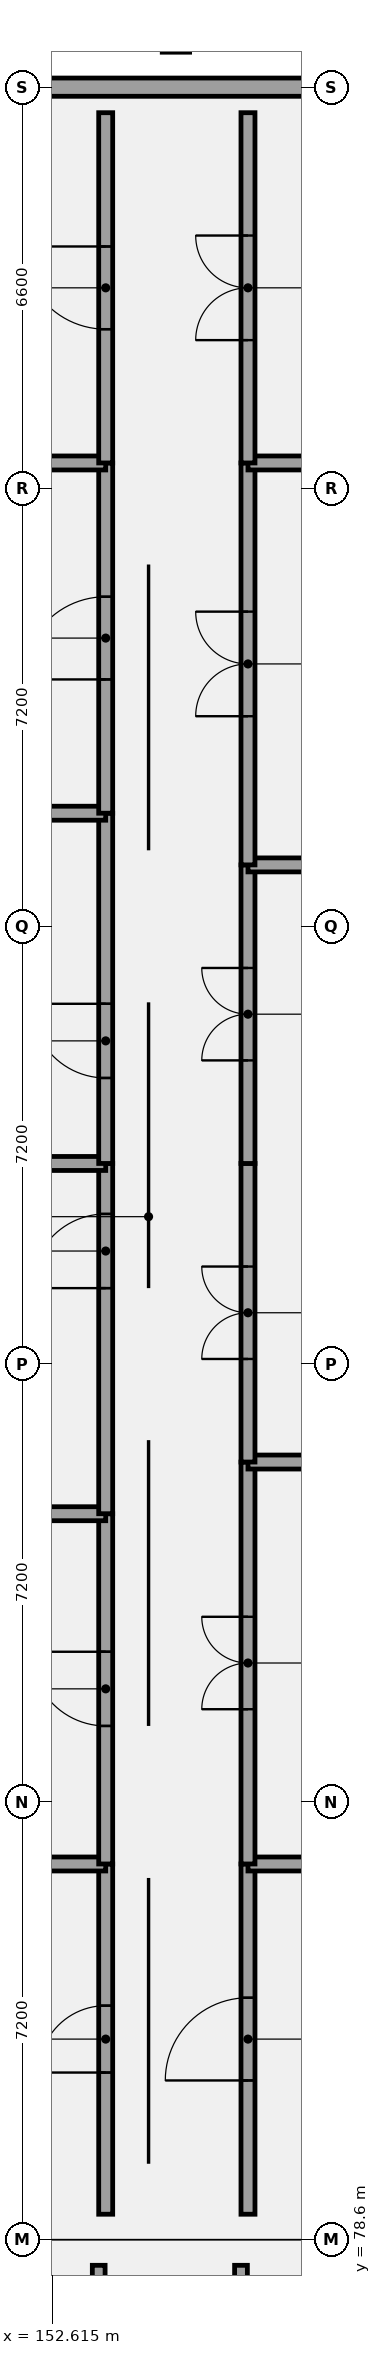
"""IFC4 building model, lengths in metres.
Left out: names, types, materials, properties, quantities, classifications, styles, units other than length and angle.
Written with IfcOpenShell. Run it as: python <this file> out.ifc"""

import sys

from ifc_helpers import new_model, si_unit, direction, frame, frame_2d, origin, origin_2d, place, context, subcontext, project, spatial, rectangle, extrude, element, fill, save


model = new_model("IFC4")
c1 = context("Model", 3, precision=1e-05, world=origin(), true_north=direction((0.0, 1.0)))
c2 = subcontext(c1, "Body", "Model", "MODEL_VIEW")
j1 = project(units=[si_unit("LENGTHUNIT", "METRE"), si_unit("PLANEANGLEUNIT", "RADIAN")], contexts=[c1])
p1 = place(None, origin())
s1 = spatial("IfcSite", under=j1, at=p1, CompositionType="ELEMENT")
p2 = place(p1, origin())
s2 = spatial("IfcBuilding", under=s1, at=p2, CompositionType="ELEMENT")
p3 = place(p2, frame((0.0, 0.0, 9.6)))
s3 = spatial("IfcBuildingStorey", under=s2, at=p3, CompositionType="ELEMENT", Elevation=9.6)
p4 = place(p3, frame((154.65, 114.95, 0.0), z_axis=(0.0, 0.0, 1.0), x_axis=(1.0, 0.0, 0.0)))
e1 = element("IfcColumn", 1, at=p4, inside=s3, PredefinedType="PILASTER", context=c2, shape_type="SweptSolid", body=[
    extrude(rectangle(XDim=0.45, YDim=0.75, at=origin_2d()), origin(), (0.0, 0.0, 1.0), 4.2),
])
p5 = place(p3, frame((166.35, 114.0, 0.0), z_axis=(0.0, 0.0, 1.0), x_axis=(-1.0, 0.0, 0.0)))
e2 = element("IfcWall", 2, at=p5, inside=s3, PredefinedType="SOLIDWALL", context=c2, shape_type="SweptSolid", body=[
    extrude(rectangle(XDim=21.9, YDim=0.3, at=frame_2d((10.95, 0.0))), origin(), (0.0, 0.0, 1.0), 3.19),
])
p6 = place(p5, frame((17.5, 0.0, 0.95)))
e3 = element("IfcOpeningElement", 3, at=p6, cuts=e2, PredefinedType="OPENING", context=c2, shape_type="SweptSolid", body=[
    extrude(rectangle(XDim=1.3, YDim=1.65, at=frame_2d((0.65, 0.825))), frame((0.0, 0.16, 0.0), z_axis=(0.0, -1.0, 0.0), x_axis=(1.0, 0.0, 0.0)), (0.0, 0.0, 1.0), 0.32),
])
p7 = place(p3, frame((153.495, 79.02, 0.0), z_axis=(0.0, 0.0, 1.0), x_axis=(0.0, 1.0, 0.0)))
e4 = element("IfcWall", 4, at=p7, inside=s3, PredefinedType="PARTITIONING", context=c2, shape_type="SweptSolid", body=[
    extrude(rectangle(XDim=5.76, YDim=0.23, at=frame_2d((2.88, 0.0))), origin(), (0.0, 0.0, 1.0), 3.94),
])
p8 = place(p7, frame((2.33, 0.0, 0.0)))
e5 = element("IfcOpeningElement", 5, at=p8, cuts=e4, PredefinedType="OPENING", context=c2, shape_type="SweptSolid", body=[
    extrude(rectangle(XDim=1.1, YDim=2.35, at=frame_2d((0.55, 1.175))), frame((0.0, 0.125, 0.0), z_axis=(0.0, -1.0, 0.0), x_axis=(1.0, 0.0, 0.0)), (0.0, 0.0, 1.0), 0.25),
])
p9 = place(p3, frame((145.25, 84.78, 0.0), z_axis=(0.0, 0.0, 1.0), x_axis=(1.0, 0.0, 0.0)))
e6 = element("IfcWall", 6, at=p9, inside=s3, PredefinedType="PARTITIONING", context=c2, shape_type="SweptSolid", body=[
    extrude(rectangle(XDim=8.245, YDim=0.23, at=frame_2d((4.123, 0.0))), origin(), (0.0, 0.0, 1.0), 3.94),
])
p10 = place(p3, frame((153.495, 84.78, 0.0), z_axis=(0.0, 0.0, 1.0), x_axis=(0.0, 1.0, 0.0)))
e7 = element("IfcWall", 7, at=p10, inside=s3, PredefinedType="PARTITIONING", context=c2, shape_type="SweptSolid", body=[
    extrude(rectangle(XDim=5.76, YDim=0.23, at=frame_2d((2.88, 0.0))), origin(), (0.0, 0.0, 1.0), 3.94),
])
p11 = place(p10, frame((2.27, 0.0, 0.0)))
e8 = element("IfcOpeningElement", 8, at=p11, cuts=e7, PredefinedType="OPENING", context=c2, shape_type="SweptSolid", body=[
    extrude(rectangle(XDim=1.22, YDim=2.1, at=frame_2d((0.61, 1.05))), frame((0.0, 0.125, 0.0), z_axis=(0.0, -1.0, 0.0), x_axis=(1.0, 0.0, 0.0)), (0.0, 0.0, 1.0), 0.25),
])
p12 = place(p3, frame((145.25, 90.54, 0.0), z_axis=(0.0, 0.0, 1.0), x_axis=(1.0, 0.0, 0.0)))
e9 = element("IfcWall", 9, at=p12, inside=s3, PredefinedType="PARTITIONING", context=c2, shape_type="SweptSolid", body=[
    extrude(rectangle(XDim=8.245, YDim=0.23, at=frame_2d((4.123, 0.0))), origin(), (0.0, 0.0, 1.0), 3.94),
])
p13 = place(p3, frame((153.495, 90.54, 0.0), z_axis=(0.0, 0.0, 1.0), x_axis=(0.0, 1.0, 0.0)))
e10 = element("IfcWall", 10, at=p13, inside=s3, PredefinedType="PARTITIONING", context=c2, shape_type="SweptSolid", body=[
    extrude(rectangle(XDim=5.76, YDim=0.23, at=frame_2d((2.88, 0.0))), origin(), (0.0, 0.0, 1.0), 3.94),
])
p14 = place(p13, frame((3.71, 0.0, 0.0)))
e11 = element("IfcOpeningElement", 11, at=p14, cuts=e10, PredefinedType="OPENING", context=c2, shape_type="SweptSolid", body=[
    extrude(rectangle(XDim=1.22, YDim=2.22, at=frame_2d((0.61, 1.11))), frame((0.0, 0.125, 0.0), z_axis=(0.0, -1.0, 0.0), x_axis=(1.0, 0.0, 0.0)), (0.0, 0.0, 1.0), 0.25),
])
p15 = place(p3, frame((145.25, 96.3, 0.0), z_axis=(0.0, 0.0, 1.0), x_axis=(1.0, 0.0, 0.0)))
e12 = element("IfcWall", 12, at=p15, inside=s3, PredefinedType="PARTITIONING", context=c2, shape_type="SweptSolid", body=[
    extrude(rectangle(XDim=8.245, YDim=0.23, at=frame_2d((4.123, 0.0))), origin(), (0.0, 0.0, 1.0), 3.39),
])
p16 = place(p3, frame((153.495, 96.3, 0.0), z_axis=(0.0, 0.0, 1.0), x_axis=(0.0, 1.0, 0.0)))
e13 = element("IfcWall", 13, at=p16, inside=s3, PredefinedType="PARTITIONING", context=c2, shape_type="SweptSolid", body=[
    extrude(rectangle(XDim=5.76, YDim=0.23, at=frame_2d((2.88, 0.0))), origin(), (0.0, 0.0, 1.0), 3.94),
])
p17 = place(p16, frame((1.406, 0.0, 0.0)))
e14 = element("IfcOpeningElement", 14, at=p17, cuts=e13, PredefinedType="OPENING", context=c2, shape_type="SweptSolid", body=[
    extrude(rectangle(XDim=1.22, YDim=2.35, at=frame_2d((0.61, 1.175))), frame((0.0, 0.125, 0.0), z_axis=(0.0, -1.0, 0.0), x_axis=(1.0, 0.0, 0.0)), (0.0, 0.0, 1.0), 0.25),
])
p18 = place(p3, frame((145.25, 102.06, 0.0), z_axis=(0.0, 0.0, 1.0), x_axis=(1.0, 0.0, 0.0)))
e15 = element("IfcWall", 15, at=p18, inside=s3, PredefinedType="PARTITIONING", context=c2, shape_type="SweptSolid", body=[
    extrude(rectangle(XDim=8.245, YDim=0.23, at=frame_2d((4.123, 0.0))), origin(), (0.0, 0.0, 1.0), 3.39),
])
p19 = place(p3, frame((153.495, 102.06, 0.0), z_axis=(0.0, 0.0, 1.0), x_axis=(0.0, 1.0, 0.0)))
e16 = element("IfcWall", 16, at=p19, inside=s3, PredefinedType="PARTITIONING", context=c2, shape_type="SweptSolid", body=[
    extrude(rectangle(XDim=5.76, YDim=0.23, at=frame_2d((2.88, 0.0))), origin(), (0.0, 0.0, 1.0), 3.94),
])
p20 = place(p19, frame((2.2, 0.0, 0.0)))
e17 = element("IfcOpeningElement", 17, at=p20, cuts=e16, PredefinedType="OPENING", context=c2, shape_type="SweptSolid", body=[
    extrude(rectangle(XDim=1.36, YDim=2.1, at=frame_2d((0.68, 1.05))), frame((0.0, 0.125, 0.0), z_axis=(0.0, -1.0, 0.0), x_axis=(1.0, 0.0, 0.0)), (0.0, 0.0, 1.0), 0.25),
])
p21 = place(p3, frame((145.25, 107.82, 0.0), z_axis=(0.0, 0.0, 1.0), x_axis=(1.0, 0.0, 0.0)))
e18 = element("IfcWall", 18, at=p21, inside=s3, PredefinedType="PARTITIONING", context=c2, shape_type="SweptSolid", body=[
    extrude(rectangle(XDim=8.245, YDim=0.23, at=frame_2d((4.123, 0.0))), origin(), (0.0, 0.0, 1.0), 3.94),
])
p22 = place(p3, frame((153.495, 107.82, 0.0), z_axis=(0.0, 0.0, 1.0), x_axis=(0.0, 1.0, 0.0)))
e19 = element("IfcWall", 19, at=p22, inside=s3, PredefinedType="PARTITIONING", context=c2, shape_type="SweptSolid", body=[
    extrude(rectangle(XDim=5.76, YDim=0.23, at=frame_2d((2.88, 0.0))), origin(), (0.0, 0.0, 1.0), 3.94),
])
p23 = place(p22, frame((2.2, 0.0, 0.0)))
e20 = element("IfcOpeningElement", 20, at=p23, cuts=e19, PredefinedType="OPENING", context=c2, shape_type="SweptSolid", body=[
    extrude(rectangle(XDim=1.36, YDim=2.22, at=frame_2d((0.68, 1.11))), frame((0.0, 0.125, 0.0), z_axis=(0.0, -1.0, 0.0), x_axis=(1.0, 0.0, 0.0)), (0.0, 0.0, 1.0), 0.25),
])
p24 = place(p3, frame((155.835, 79.02, 0.0), z_axis=(0.0, 0.0, 1.0), x_axis=(0.0, 1.0, 0.0)))
e21 = element("IfcWall", 21, at=p24, inside=s3, PredefinedType="PARTITIONING", context=c2, shape_type="SweptSolid", body=[
    extrude(rectangle(XDim=5.76, YDim=0.23, at=frame_2d((2.88, 0.0))), origin(), (0.0, 0.0, 1.0), 3.94),
])
p25 = place(p24, frame((2.2, 0.0, 0.0)))
e22 = element("IfcOpeningElement", 22, at=p25, cuts=e21, PredefinedType="OPENING", context=c2, shape_type="SweptSolid", body=[
    extrude(rectangle(XDim=1.36, YDim=2.35, at=frame_2d((0.68, 1.175))), frame((0.0, 0.125, 0.0), z_axis=(0.0, -1.0, 0.0), x_axis=(1.0, 0.0, 0.0)), (0.0, 0.0, 1.0), 0.25),
])
p26 = place(p3, frame((155.835, 84.78, 0.0), z_axis=(0.0, 0.0, 1.0), x_axis=(1.0, 0.0, 0.0)))
e23 = element("IfcWall", 23, at=p26, inside=s3, PredefinedType="PARTITIONING", context=c2, shape_type="SweptSolid", body=[
    extrude(rectangle(XDim=10.185, YDim=0.23, at=frame_2d((5.093, 0.0))), origin(), (0.0, 0.0, 1.0), 3.94),
])
p27 = place(p3, frame((155.835, 84.78, 0.0), z_axis=(0.0, 0.0, 1.0), x_axis=(0.0, 1.0, 0.0)))
e24 = element("IfcWall", 24, at=p27, inside=s3, PredefinedType="PARTITIONING", context=c2, shape_type="SweptSolid", body=[
    extrude(rectangle(XDim=6.61, YDim=0.23, at=frame_2d((3.305, 0.0))), origin(), (0.0, 0.0, 1.0), 3.94),
])
p28 = place(p27, frame((2.545, 0.0, 0.0)))
e25 = element("IfcOpeningElement", 25, at=p28, cuts=e24, PredefinedType="OPENING", context=c2, shape_type="SweptSolid", body=[
    extrude(rectangle(XDim=1.52, YDim=2.1, at=frame_2d((0.76, 1.05))), frame((0.0, 0.125, 0.0), z_axis=(0.0, -1.0, 0.0), x_axis=(1.0, 0.0, 0.0)), (0.0, 0.0, 1.0), 0.25),
])
p29 = place(p3, frame((155.835, 91.39, 0.0), z_axis=(0.0, 0.0, 1.0), x_axis=(1.0, 0.0, 0.0)))
e26 = element("IfcWall", 26, at=p29, inside=s3, PredefinedType="PARTITIONING", context=c2, shape_type="SweptSolid", body=[
    extrude(rectangle(XDim=10.185, YDim=0.23, at=frame_2d((5.093, 0.0))), origin(), (0.0, 0.0, 1.0), 3.39),
])
p30 = place(p3, frame((155.835, 91.39, 0.0), z_axis=(0.0, 0.0, 1.0), x_axis=(0.0, 1.0, 0.0)))
e27 = element("IfcWall", 27, at=p30, inside=s3, PredefinedType="PARTITIONING", context=c2, shape_type="SweptSolid", body=[
    extrude(rectangle(XDim=4.91, YDim=0.23, at=frame_2d((2.455, 0.0))), origin(), (0.0, 0.0, 1.0), 3.94),
])
p31 = place(p30, frame((1.695, 0.0, 0.0)))
e28 = element("IfcOpeningElement", 28, at=p31, cuts=e27, PredefinedType="OPENING", context=c2, shape_type="SweptSolid", body=[
    extrude(rectangle(XDim=1.52, YDim=2.22, at=frame_2d((0.76, 1.11))), frame((0.0, 0.125, 0.0), z_axis=(0.0, -1.0, 0.0), x_axis=(1.0, 0.0, 0.0)), (0.0, 0.0, 1.0), 0.25),
])
p32 = place(p3, frame((155.835, 96.3, 0.0), z_axis=(0.0, 0.0, 1.0), x_axis=(0.0, 1.0, 0.0)))
e29 = element("IfcWall", 29, at=p32, inside=s3, PredefinedType="PARTITIONING", context=c2, shape_type="SweptSolid", body=[
    extrude(rectangle(XDim=4.91, YDim=0.23, at=frame_2d((2.455, 0.0))), origin(), (0.0, 0.0, 1.0), 3.94),
])
p33 = place(p32, frame((1.695, 0.0, 0.0)))
e30 = element("IfcOpeningElement", 30, at=p33, cuts=e29, PredefinedType="OPENING", context=c2, shape_type="SweptSolid", body=[
    extrude(rectangle(XDim=1.52, YDim=2.35, at=frame_2d((0.76, 1.175))), frame((0.0, 0.125, 0.0), z_axis=(0.0, -1.0, 0.0), x_axis=(1.0, 0.0, 0.0)), (0.0, 0.0, 1.0), 0.25),
])
p34 = place(p3, frame((155.835, 101.21, 0.0), z_axis=(0.0, 0.0, 1.0), x_axis=(1.0, 0.0, 0.0)))
e31 = element("IfcWall", 31, at=p34, inside=s3, PredefinedType="PARTITIONING", context=c2, shape_type="SweptSolid", body=[
    extrude(rectangle(XDim=10.185, YDim=0.23, at=frame_2d((5.093, 0.0))), origin(), (0.0, 0.0, 1.0), 3.94),
])
p35 = place(p3, frame((155.835, 101.21, 0.0), z_axis=(0.0, 0.0, 1.0), x_axis=(0.0, 1.0, 0.0)))
e32 = element("IfcWall", 32, at=p35, inside=s3, PredefinedType="PARTITIONING", context=c2, shape_type="SweptSolid", body=[
    extrude(rectangle(XDim=6.61, YDim=0.23, at=frame_2d((3.305, 0.0))), origin(), (0.0, 0.0, 1.0), 3.94),
])
p36 = place(p35, frame((2.445, 0.0, 0.0)))
e33 = element("IfcOpeningElement", 33, at=p36, cuts=e32, PredefinedType="OPENING", context=c2, shape_type="SweptSolid", body=[
    extrude(rectangle(XDim=1.72, YDim=2.1, at=frame_2d((0.86, 1.05))), frame((0.0, 0.125, 0.0), z_axis=(0.0, -1.0, 0.0), x_axis=(1.0, 0.0, 0.0)), (0.0, 0.0, 1.0), 0.25),
])
p37 = place(p3, frame((155.835, 107.82, 0.0), z_axis=(0.0, 0.0, 1.0), x_axis=(1.0, 0.0, 0.0)))
e34 = element("IfcWall", 34, at=p37, inside=s3, PredefinedType="PARTITIONING", context=c2, shape_type="SweptSolid", body=[
    extrude(rectangle(XDim=10.185, YDim=0.23, at=frame_2d((5.093, 0.0))), origin(), (0.0, 0.0, 1.0), 3.94),
])
p38 = place(p3, frame((155.835, 107.82, 0.0), z_axis=(0.0, 0.0, 1.0), x_axis=(0.0, 1.0, 0.0)))
e35 = element("IfcWall", 35, at=p38, inside=s3, PredefinedType="PARTITIONING", context=c2, shape_type="SweptSolid", body=[
    extrude(rectangle(XDim=5.76, YDim=0.23, at=frame_2d((2.88, 0.0))), origin(), (0.0, 0.0, 1.0), 3.94),
])
p39 = place(p38, frame((2.02, 0.0, 0.0)))
e36 = element("IfcOpeningElement", 36, at=p39, cuts=e35, PredefinedType="OPENING", context=c2, shape_type="SweptSolid", body=[
    extrude(rectangle(XDim=1.72, YDim=2.22, at=frame_2d((0.86, 1.11))), frame((0.0, 0.125, 0.0), z_axis=(0.0, -1.0, 0.0), x_axis=(1.0, 0.0, 0.0)), (0.0, 0.0, 1.0), 0.25),
])
p40 = place(p3, frame((153.38, 71.248, 0.0), z_axis=(0.0, 0.0, 1.0), x_axis=(0.0, 1.0, 0.0)))
e37 = element("IfcWall", 37, at=p40, inside=s3, PredefinedType="PARTITIONING", context=c2, shape_type="SweptSolid", body=[
    extrude(rectangle(XDim=6.932, YDim=0.21, at=frame_2d((3.466, 0.0))), origin(), (0.0, 0.0, 1.0), 3.94),
])
p41 = place(p40, frame((2.916, 0.0, 0.0)))
e38 = element("IfcOpeningElement", 38, at=p41, cuts=e37, PredefinedType="OPENING", context=c2, shape_type="SweptSolid", body=[
    extrude(rectangle(XDim=1.1, YDim=2.22, at=frame_2d((0.55, 1.11))), frame((0.0, 0.115, 0.0), z_axis=(0.0, -1.0, 0.0), x_axis=(1.0, 0.0, 0.0)), (0.0, 0.0, 1.0), 0.23),
])
p42 = place(p3, frame((155.72, 72.634, 0.0), z_axis=(0.0, 0.0, 1.0), x_axis=(0.0, 1.0, 0.0)))
e39 = element("IfcWall", 39, at=p42, inside=s3, PredefinedType="PARTITIONING", context=c2, shape_type="SweptSolid", body=[
    extrude(rectangle(XDim=5.546, YDim=0.21, at=frame_2d((2.773, 0.0))), origin(), (0.0, 0.0, 1.0), 3.94),
])
p43 = place(p42, frame((2.163, 0.0, 0.0)))
e40 = element("IfcOpeningElement", 40, at=p43, cuts=e39, PredefinedType="OPENING", context=c2, shape_type="SweptSolid", body=[
    extrude(rectangle(XDim=1.22, YDim=2.35, at=frame_2d((0.61, 1.175))), frame((0.0, 0.115, 0.0), z_axis=(0.0, -1.0, 0.0), x_axis=(1.0, 0.0, 0.0)), (0.0, 0.0, 1.0), 0.23),
])
p44 = place(p8, frame((1.1, 0.0, 0.0), z_axis=(0.0, 0.0, 1.0), x_axis=(-1.0, 0.0, 0.0)))
e41 = element("IfcDoor", 41, at=p44, inside=s3, OperationType="SINGLE_SWING_LEFT", PredefinedType="DOOR", context=c2, shape_type="SweptSolid", body=[
    extrude(rectangle(XDim=1.1, YDim=2.35, at=frame_2d((0.55, 1.175))), frame((0.0, 0.025, 0.0), z_axis=(0.0, -1.0, 0.0), x_axis=(1.0, 0.0, 0.0)), (0.0, 0.0, 1.0), 0.05),
])
fill(e5, e41)
p45 = place(p11, frame((1.22, 0.0, 0.0), z_axis=(0.0, 0.0, 1.0), x_axis=(-1.0, 0.0, 0.0)))
e42 = element("IfcDoor", 42, at=p45, inside=s3, OperationType="SINGLE_SWING_RIGHT", PredefinedType="DOOR", context=c2, shape_type="SweptSolid", body=[
    extrude(rectangle(XDim=1.22, YDim=2.1, at=frame_2d((0.61, 1.05))), frame((0.0, 0.025, 0.0), z_axis=(0.0, -1.0, 0.0), x_axis=(1.0, 0.0, 0.0)), (0.0, 0.0, 1.0), 0.05),
])
fill(e8, e42)
p46 = place(p14, frame((1.22, 0.0, 0.0), z_axis=(0.0, 0.0, 1.0), x_axis=(-1.0, 0.0, 0.0)))
e43 = element("IfcDoor", 43, at=p46, inside=s3, OperationType="SINGLE_SWING_LEFT", PredefinedType="DOOR", context=c2, shape_type="SweptSolid", body=[
    extrude(rectangle(XDim=1.22, YDim=2.22, at=frame_2d((0.61, 1.11))), frame((0.0, 0.025, 0.0), z_axis=(0.0, -1.0, 0.0), x_axis=(1.0, 0.0, 0.0)), (0.0, 0.0, 1.0), 0.05),
])
fill(e11, e43)
p47 = place(p17, frame((1.22, 0.0, 0.0), z_axis=(0.0, 0.0, 1.0), x_axis=(-1.0, 0.0, 0.0)))
e44 = element("IfcDoor", 44, at=p47, inside=s3, OperationType="SINGLE_SWING_RIGHT", PredefinedType="DOOR", context=c2, shape_type="SweptSolid", body=[
    extrude(rectangle(XDim=1.22, YDim=2.35, at=frame_2d((0.61, 1.175))), frame((0.0, 0.025, 0.0), z_axis=(0.0, -1.0, 0.0), x_axis=(1.0, 0.0, 0.0)), (0.0, 0.0, 1.0), 0.05),
])
fill(e14, e44)
p48 = place(p20, frame((1.36, 0.0, 0.0), z_axis=(0.0, 0.0, 1.0), x_axis=(-1.0, 0.0, 0.0)))
e45 = element("IfcDoor", 45, at=p48, inside=s3, OperationType="SINGLE_SWING_LEFT", PredefinedType="DOOR", context=c2, shape_type="SweptSolid", body=[
    extrude(rectangle(XDim=1.36, YDim=2.1, at=frame_2d((0.68, 1.05))), frame((0.0, 0.025, 0.0), z_axis=(0.0, -1.0, 0.0), x_axis=(1.0, 0.0, 0.0)), (0.0, 0.0, 1.0), 0.05),
])
fill(e17, e45)
p49 = place(p23, frame((1.36, 0.0, 0.0), z_axis=(0.0, 0.0, 1.0), x_axis=(-1.0, 0.0, 0.0)))
e46 = element("IfcDoor", 46, at=p49, inside=s3, OperationType="SINGLE_SWING_RIGHT", PredefinedType="DOOR", context=c2, shape_type="SweptSolid", body=[
    extrude(rectangle(XDim=1.36, YDim=2.22, at=frame_2d((0.68, 1.11))), frame((0.0, 0.025, 0.0), z_axis=(0.0, -1.0, 0.0), x_axis=(1.0, 0.0, 0.0)), (0.0, 0.0, 1.0), 0.05),
])
fill(e20, e46)
p50 = place(p25, origin())
e47 = element("IfcDoor", 47, at=p50, inside=s3, OperationType="SINGLE_SWING_LEFT", PredefinedType="DOOR", context=c2, shape_type="SweptSolid", body=[
    extrude(rectangle(XDim=1.36, YDim=2.35, at=frame_2d((0.68, 1.175))), frame((0.0, 0.025, 0.0), z_axis=(0.0, -1.0, 0.0), x_axis=(1.0, 0.0, 0.0)), (0.0, 0.0, 1.0), 0.05),
])
fill(e22, e47)
p51 = place(p28, origin())
e48 = element("IfcDoor", 48, at=p51, inside=s3, OperationType="DOUBLE_DOOR_SINGLE_SWING", PredefinedType="DOOR", context=c2, shape_type="SweptSolid", body=[
    extrude(rectangle(XDim=1.52, YDim=2.1, at=frame_2d((0.76, 1.05))), frame((0.0, 0.025, 0.0), z_axis=(0.0, -1.0, 0.0), x_axis=(1.0, 0.0, 0.0)), (0.0, 0.0, 1.0), 0.05),
])
fill(e25, e48)
p52 = place(p31, origin())
e49 = element("IfcDoor", 49, at=p52, inside=s3, OperationType="DOUBLE_DOOR_SINGLE_SWING", PredefinedType="DOOR", context=c2, shape_type="SweptSolid", body=[
    extrude(rectangle(XDim=1.52, YDim=2.22, at=frame_2d((0.76, 1.11))), frame((0.0, 0.025, 0.0), z_axis=(0.0, -1.0, 0.0), x_axis=(1.0, 0.0, 0.0)), (0.0, 0.0, 1.0), 0.05),
])
fill(e28, e49)
p53 = place(p33, origin())
e50 = element("IfcDoor", 50, at=p53, inside=s3, OperationType="DOUBLE_DOOR_SINGLE_SWING", PredefinedType="DOOR", context=c2, shape_type="SweptSolid", body=[
    extrude(rectangle(XDim=1.52, YDim=2.35, at=frame_2d((0.76, 1.175))), frame((0.0, 0.025, 0.0), z_axis=(0.0, -1.0, 0.0), x_axis=(1.0, 0.0, 0.0)), (0.0, 0.0, 1.0), 0.05),
])
fill(e30, e50)
p54 = place(p36, origin())
e51 = element("IfcDoor", 51, at=p54, inside=s3, OperationType="DOUBLE_DOOR_SINGLE_SWING", PredefinedType="DOOR", context=c2, shape_type="SweptSolid", body=[
    extrude(rectangle(XDim=1.72, YDim=2.1, at=frame_2d((0.86, 1.05))), frame((0.0, 0.025, 0.0), z_axis=(0.0, -1.0, 0.0), x_axis=(1.0, 0.0, 0.0)), (0.0, 0.0, 1.0), 0.05),
])
fill(e33, e51)
p55 = place(p39, origin())
e52 = element("IfcDoor", 52, at=p55, inside=s3, OperationType="DOUBLE_DOOR_SINGLE_SWING", PredefinedType="DOOR", context=c2, shape_type="SweptSolid", body=[
    extrude(rectangle(XDim=1.72, YDim=2.22, at=frame_2d((0.86, 1.11))), frame((0.0, 0.025, 0.0), z_axis=(0.0, -1.0, 0.0), x_axis=(1.0, 0.0, 0.0)), (0.0, 0.0, 1.0), 0.05),
])
fill(e36, e52)
save(model, sys.argv[1])
